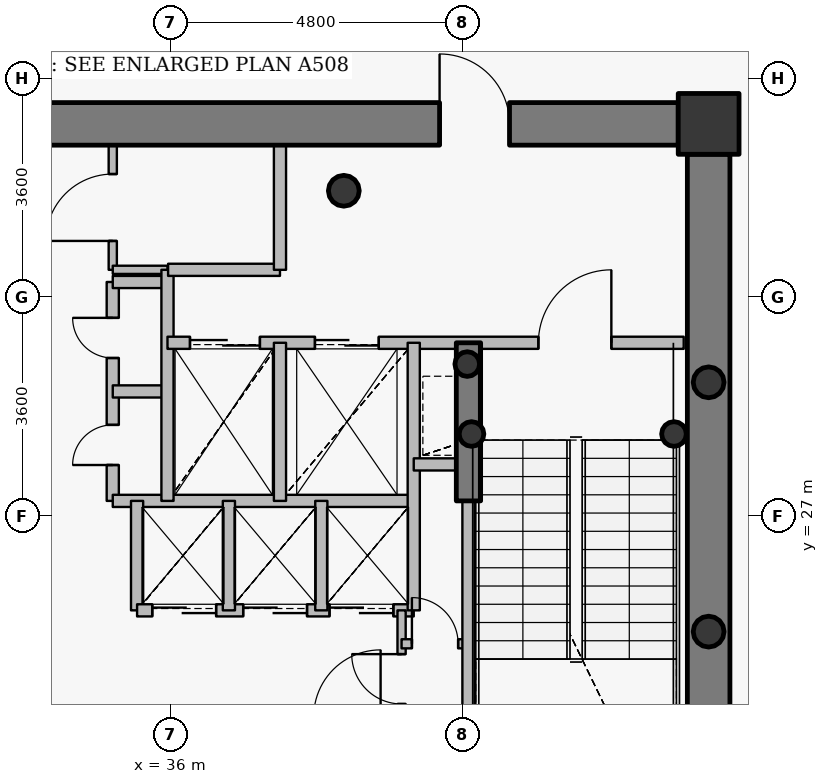
"""IFC4 building model, lengths in metres.
Left out: names, types, materials, properties, quantities, classifications, styles, units other than length and angle.
Written with IfcOpenShell. Run it as: python <this file> out.ifc"""

import sys

from ifc_helpers import new_model, si_unit, direction, frame, frame_2d, origin, origin_2d, place, context, subcontext, project, spatial, rectangle, hollow_circle, extrude, source, transform, mapped, element, fill, save


model = new_model("IFC4")
c1 = context("Model", 3, precision=1e-05, world=origin(), true_north=direction((0.0, 1.0)))
c2 = subcontext(c1, "Body", "Model", "MODEL_VIEW")
j1 = project(units=[si_unit("LENGTHUNIT", "METRE"), si_unit("PLANEANGLEUNIT", "RADIAN")], contexts=[c1])
p1 = place(None, origin())
s1 = spatial("IfcSite", under=j1, at=p1, CompositionType="ELEMENT")
p2 = place(p1, origin())
s2 = spatial("IfcBuilding", under=s1, at=p2, CompositionType="ELEMENT")
p3 = place(p2, frame((0.0, 0.0, 273.0)))
s3 = spatial("IfcBuildingStorey", under=s2, at=p3, CompositionType="ELEMENT", Elevation=273.0)
p4 = place(p3, frame((44.85, 33.45, 0.0), z_axis=(0.0, 0.0, 1.0), x_axis=(1.0, 0.0, 0.0)))
e1 = element("IfcColumn", 1, at=p4, inside=s3, PredefinedType="COLUMN", context=c2, shape_type="SweptSolid", body=[
    extrude(rectangle(XDim=1.0, YDim=1.0, at=origin_2d()), origin(), (0.0, 0.0, 1.0), 3.75),
])
p5 = place(p3, frame((38.85, 32.35, 0.0), z_axis=(0.0, 0.0, 1.0), x_axis=(1.0, 0.0, 0.0)))
e2 = element("IfcColumn", 2, at=p5, inside=s3, PredefinedType="COLUMN", context=c2, shape_type="SweptSolid", body=[
    extrude(hollow_circle(Radius=0.254, WallThickness=0.02, at=origin_2d()), origin(), (0.0, 0.0, 1.0), 3.75),
])
for number, where, z_axis, x_axis in (
    (3, (40.95, 28.35, 0.0), (0.0, 0.0, 1.0), (1.0, 0.0, 0.0)),
    (4, (44.28, 28.35, 0.0), (0.0, 0.0, 1.0), (1.0, 0.0, 0.0)),
    (5, (40.88, 29.5, 0.0), (0.0, 0.0, 1.0), (1.0, 0.0, 0.0)),
):
    element("IfcColumn", number, at=place(p3, frame(where, z_axis=z_axis, x_axis=x_axis)), inside=s3, PredefinedType="COLUMN", context=c2, shape_type="SweptSolid", body=[
        extrude(hollow_circle(Radius=0.203, WallThickness=0.016, at=origin_2d()), origin(), (0.0, 0.0, 1.0), 3.75),
    ])
p6 = place(p3, frame((27.65, 33.45, 0.0), z_axis=(0.0, 0.0, 1.0), x_axis=(1.0, 0.0, 0.0)))
e6 = element("IfcWall", 6, at=p6, inside=s3, PredefinedType="SHEAR", context=c2, shape_type="SweptSolid", body=[
    extrude(rectangle(XDim=16.7, YDim=0.7, at=frame_2d((8.35, 0.0))), origin(), (0.0, 0.0, 1.0), 3.05),
])
p7 = place(p6, frame((12.775, 0.0, 0.0)))
e7 = element("IfcOpeningElement", 7, at=p7, cuts=e6, PredefinedType="OPENING", context=c2, shape_type="SweptSolid", body=[
    extrude(rectangle(XDim=1.15, YDim=2.15, at=origin_2d()), frame((0.575, 0.36, 1.075), z_axis=(0.0, -1.0, 0.0), x_axis=(1.0, 0.0, 0.0)), (0.0, 0.0, 1.0), 0.72),
])
p8 = place(p3, frame((44.85, 32.95, 0.0), z_axis=(0.0, 0.0, 1.0), x_axis=(0.0, -1.0, 0.0)))
e8 = element("IfcWall", 8, at=p8, inside=s3, PredefinedType="SHEAR", context=c2, shape_type="SweptSolid", body=[
    extrude(rectangle(XDim=11.9, YDim=0.7, at=frame_2d((5.95, 0.0))), origin(), (0.0, 0.0, 1.0), 3.05),
])
p9 = place(p3, frame((40.9, 27.25, 0.0), z_axis=(0.0, 0.0, 1.0), x_axis=(0.0, 1.0, 0.0)))
e9 = element("IfcWall", 9, at=p9, inside=s3, PredefinedType="SHEAR", context=c2, shape_type="SweptSolid", body=[
    extrude(rectangle(XDim=2.6, YDim=0.4, at=frame_2d((1.3, 0.0))), origin(), (0.0, 0.0, 1.0), 3.1),
])
for number, where, z_axis, x_axis in (
    (10, (44.85, 25.1, 0.0), (0.0, 0.0, 1.0), (1.0, 0.0, 0.0)),
    (11, (44.85, 29.2, 0.0), (0.0, 0.0, 1.0), (1.0, 0.0, 0.0)),
):
    element("IfcColumn", number, at=place(p3, frame(where, z_axis=z_axis, x_axis=x_axis)), inside=s3, PredefinedType="COLUMN", context=c2, shape_type="SweptSolid", body=[
        extrude(hollow_circle(Radius=0.254, WallThickness=0.02, at=origin_2d()), origin(), (0.0, 0.0, 1.0), 3.75),
    ])
p10 = place(p3, frame((35.05, 27.25, 0.0), z_axis=(0.0, 0.0, 1.0), x_axis=(0.0, 1.0, 0.0)))
e12 = element("IfcWall", 12, at=p10, inside=s3, PredefinedType="PARTITIONING", context=c2, shape_type="SweptSolid", body=[
    extrude(rectangle(XDim=3.6, YDim=0.2, at=frame_2d((1.8, 0.0))), origin(), (0.0, 0.0, 1.0), 3.5),
])
p11 = place(p10, frame((0.59, 0.0, 0.0)))
e13 = element("IfcOpeningElement", 13, at=p11, cuts=e12, PredefinedType="OPENING", context=c2, shape_type="SweptSolid", body=[
    extrude(rectangle(XDim=0.66, YDim=2.05, at=origin_2d()), frame((0.33, 0.11, 1.025), z_axis=(0.0, -1.0, 0.0), x_axis=(1.0, 0.0, 0.0)), (0.0, 0.0, 1.0), 0.22),
])
p12 = place(p10, frame((2.35, 0.0, 0.0)))
e14 = element("IfcOpeningElement", 14, at=p12, cuts=e12, PredefinedType="OPENING", context=c2, shape_type="SweptSolid", body=[
    extrude(rectangle(XDim=0.66, YDim=2.05, at=origin_2d()), frame((0.33, 0.11, 1.025), z_axis=(0.0, -1.0, 0.0), x_axis=(1.0, 0.0, 0.0)), (0.0, 0.0, 1.0), 0.22),
])
p13 = place(p3, frame((35.05, 27.25, 0.0), z_axis=(0.0, 0.0, 1.0), x_axis=(1.0, 0.0, 0.0)))
e15 = element("IfcWall", 15, at=p13, inside=s3, PredefinedType="PARTITIONING", context=c2, shape_type="SweptSolid", body=[
    extrude(rectangle(XDim=4.95, YDim=0.2, at=frame_2d((2.475, 0.0))), origin(), (0.0, 0.0, 1.0), 3.085),
])
for number, where, z_axis, x_axis in (
    (16, (35.05, 29.05, 0.0), (0.0, 0.0, 1.0), (1.0, 0.0, 0.0)),
    (17, (35.05, 30.85, 0.0), (0.0, 0.0, 1.0), (1.0, 0.0, 0.0)),
):
    element("IfcWall", number, at=place(p3, frame(where, z_axis=z_axis, x_axis=x_axis)), inside=s3, PredefinedType="PARTITIONING", context=c2, shape_type="SweptSolid", body=[
        extrude(rectangle(XDim=0.9, YDim=0.2, at=frame_2d((0.45, 0.0))), origin(), (0.0, 0.0, 1.0), 3.5),
    ])
p14 = place(p3, frame((35.05, 31.05, 0.0), z_axis=(0.0, 0.0, 1.0), x_axis=(0.0, 1.0, 0.0)))
e18 = element("IfcWall", 18, at=p14, inside=s3, PredefinedType="PARTITIONING", context=c2, shape_type="SweptSolid", body=[
    extrude(rectangle(XDim=2.05, YDim=0.135, at=frame_2d((1.025, 0.0))), origin(), (0.0, 0.0, 1.0), 3.085),
])
p15 = place(p14, frame((0.475, 0.0, 0.0)))
e19 = element("IfcOpeningElement", 19, at=p15, cuts=e18, PredefinedType="OPENING", context=c2, shape_type="SweptSolid", body=[
    extrude(rectangle(XDim=1.1, YDim=2.15, at=origin_2d()), frame((0.55, 0.078, 1.075), z_axis=(0.0, -1.0, 0.0), x_axis=(1.0, 0.0, 0.0)), (0.0, 0.0, 1.0), 0.155),
])
p16 = place(p3, frame((35.05, 31.05, 0.0), z_axis=(0.0, 0.0, 1.0), x_axis=(1.0, 0.0, 0.0)))
e20 = element("IfcWall", 20, at=p16, inside=s3, PredefinedType="PARTITIONING", context=c2, shape_type="SweptSolid", body=[
    extrude(rectangle(XDim=0.9, YDim=0.135, at=frame_2d((0.45, 0.0))), origin(), (0.0, 0.0, 1.0), 3.5),
])
p17 = place(p3, frame((35.45, 25.45, 0.0), z_axis=(0.0, 0.0, 1.0), x_axis=(0.0, 1.0, 0.0)))
e21 = element("IfcWall", 21, at=p17, inside=s3, PredefinedType="PARTITIONING", context=c2, shape_type="SweptSolid", body=[
    extrude(rectangle(XDim=1.8, YDim=0.2, at=frame_2d((0.9, 0.0))), origin(), (0.0, 0.0, 1.0), 3.5),
])
p18 = place(p3, frame((35.45, 25.45, 0.0), z_axis=(0.0, 0.0, 1.0), x_axis=(1.0, 0.0, 0.0)))
e22 = element("IfcWall", 22, at=p18, inside=s3, PredefinedType="PARTITIONING", context=c2, shape_type="SweptSolid", body=[
    extrude(rectangle(XDim=4.55, YDim=0.2, at=frame_2d((2.275, 0.0))), origin(), (0.0, 0.0, 1.0), 3.085),
])
p19 = place(p18, frame((0.25, 0.0, 0.0)))
e23 = element("IfcOpeningElement", 23, at=p19, cuts=e22, PredefinedType="OPENING", context=c2, shape_type="SweptSolid", body=[
    extrude(rectangle(XDim=1.05, YDim=2.15, at=origin_2d()), frame((0.525, 0.11, 1.075), z_axis=(0.0, -1.0, 0.0), x_axis=(1.0, 0.0, 0.0)), (0.0, 0.0, 1.0), 0.22),
])
p20 = place(p18, frame((1.745, 0.0, 0.0)))
e24 = element("IfcOpeningElement", 24, at=p20, cuts=e22, PredefinedType="OPENING", context=c2, shape_type="SweptSolid", body=[
    extrude(rectangle(XDim=1.05, YDim=2.15, at=origin_2d()), frame((0.525, 0.11, 1.075), z_axis=(0.0, -1.0, 0.0), x_axis=(1.0, 0.0, 0.0)), (0.0, 0.0, 1.0), 0.22),
])
p21 = place(p18, frame((3.165, 0.0, 0.0)))
e25 = element("IfcOpeningElement", 25, at=p21, cuts=e22, PredefinedType="OPENING", context=c2, shape_type="SweptSolid", body=[
    extrude(rectangle(XDim=1.05, YDim=2.15, at=origin_2d()), frame((0.525, 0.11, 1.075), z_axis=(0.0, -1.0, 0.0), x_axis=(1.0, 0.0, 0.0)), (0.0, 0.0, 1.0), 0.22),
])
p22 = place(p3, frame((35.95, 27.25, 0.0), z_axis=(0.0, 0.0, 1.0), x_axis=(0.0, 1.0, 0.0)))
e26 = element("IfcWall", 26, at=p22, inside=s3, PredefinedType="PARTITIONING", context=c2, shape_type="SweptSolid", body=[
    extrude(rectangle(XDim=3.8, YDim=0.2, at=frame_2d((1.9, 0.0))), origin(), (0.0, 0.0, 1.0), 3.5),
])
p23 = place(p3, frame((35.95, 29.85, 0.0), z_axis=(0.0, 0.0, 1.0), x_axis=(1.0, 0.0, 0.0)))
e27 = element("IfcWall", 27, at=p23, inside=s3, PredefinedType="PARTITIONING", context=c2, shape_type="SweptSolid", body=[
    extrude(rectangle(XDim=8.49, YDim=0.2, at=frame_2d((4.245, 0.0))), origin(), (0.0, 0.0, 1.0), 3.085),
])
p24 = place(p23, frame((6.1, 0.0, 0.0)))
e28 = element("IfcOpeningElement", 28, at=p24, cuts=e27, PredefinedType="OPENING", context=c2, shape_type="SweptSolid", body=[
    extrude(rectangle(XDim=1.2, YDim=2.15, at=origin_2d()), frame((0.6, 0.11, 1.075), z_axis=(0.0, -1.0, 0.0), x_axis=(1.0, 0.0, 0.0)), (0.0, 0.0, 1.0), 0.22),
])
p25 = place(p23, frame((0.37, 0.0, 0.0)))
e29 = element("IfcOpeningElement", 29, at=p25, cuts=e27, PredefinedType="OPENING", context=c2, shape_type="SweptSolid", body=[
    extrude(rectangle(XDim=1.15, YDim=2.15, at=origin_2d()), frame((0.575, 0.11, 1.075), z_axis=(0.0, -1.0, 0.0), x_axis=(1.0, 0.0, 0.0)), (0.0, 0.0, 1.0), 0.22),
])
p26 = place(p23, frame((2.425, 0.0, 0.0)))
e30 = element("IfcOpeningElement", 30, at=p26, cuts=e27, PredefinedType="OPENING", context=c2, shape_type="SweptSolid", body=[
    extrude(rectangle(XDim=1.05, YDim=2.15, at=origin_2d()), frame((0.525, 0.11, 1.075), z_axis=(0.0, -1.0, 0.0), x_axis=(1.0, 0.0, 0.0)), (0.0, 0.0, 1.0), 0.22),
])
p27 = place(p3, frame((35.96, 31.05, 0.0), z_axis=(0.0, 0.0, 1.0), x_axis=(1.0, 0.0, 0.0)))
e31 = element("IfcWall", 31, at=p27, inside=s3, PredefinedType="PARTITIONING", context=c2, shape_type="SweptSolid", body=[
    extrude(rectangle(XDim=1.84, YDim=0.2, at=frame_2d((0.92, 0.0))), origin(), (0.0, 0.0, 1.0), 3.5),
])
p28 = place(p3, frame((36.96, 25.45, 0.0), z_axis=(0.0, 0.0, 1.0), x_axis=(0.0, 1.0, 0.0)))
e32 = element("IfcWall", 32, at=p28, inside=s3, PredefinedType="PARTITIONING", context=c2, shape_type="SweptSolid", body=[
    extrude(rectangle(XDim=1.8, YDim=0.2, at=frame_2d((0.9, 0.0))), origin(), (0.0, 0.0, 1.0), 3.5),
])
p29 = place(p3, frame((37.8, 27.25, 0.0), z_axis=(0.0, 0.0, 1.0), x_axis=(0.0, 1.0, 0.0)))
e33 = element("IfcWall", 33, at=p29, inside=s3, PredefinedType="PARTITIONING", context=c2, shape_type="SweptSolid", body=[
    extrude(rectangle(XDim=2.6, YDim=0.2, at=frame_2d((1.3, 0.0))), origin(), (0.0, 0.0, 1.0), 3.5),
])
p30 = place(p3, frame((37.8, 31.05, 0.0), z_axis=(0.0, 0.0, 1.0), x_axis=(0.0, 1.0, 0.0)))
e34 = element("IfcWall", 34, at=p30, inside=s3, PredefinedType="PARTITIONING", context=c2, shape_type="SweptSolid", body=[
    extrude(rectangle(XDim=2.05, YDim=0.2, at=frame_2d((1.025, 0.0))), origin(), (0.0, 0.0, 1.0), 3.085),
])
p31 = place(p3, frame((38.48, 25.45, 0.0), z_axis=(0.0, 0.0, 1.0), x_axis=(0.0, 1.0, 0.0)))
e35 = element("IfcWall", 35, at=p31, inside=s3, PredefinedType="PARTITIONING", context=c2, shape_type="SweptSolid", body=[
    extrude(rectangle(XDim=1.8, YDim=0.2, at=frame_2d((0.9, 0.0))), origin(), (0.0, 0.0, 1.0), 3.5),
])
p32 = place(p3, frame((39.8, 23.7, 0.0), z_axis=(0.0, 0.0, 1.0), x_axis=(0.0, 1.0, 0.0)))
e36 = element("IfcWall", 36, at=p32, inside=s3, PredefinedType="PARTITIONING", context=c2, shape_type="SweptSolid", body=[
    extrude(rectangle(XDim=1.75, YDim=0.135, at=frame_2d((0.875, 0.0))), origin(), (0.0, 0.0, 1.0), 3.5),
])
p33 = place(p32, frame((0.21, 0.0, 0.0)))
e37 = element("IfcOpeningElement", 37, at=p33, cuts=e36, PredefinedType="OPENING", context=c2, shape_type="SweptSolid", body=[
    extrude(rectangle(XDim=0.82, YDim=2.1, at=origin_2d()), frame((0.41, 0.078, 1.05), z_axis=(0.0, -1.0, 0.0), x_axis=(1.0, 0.0, 0.0)), (0.0, 0.0, 1.0), 0.155),
])
p34 = place(p3, frame((39.8, 24.9, 0.0), z_axis=(0.0, 0.0, 1.0), x_axis=(1.0, 0.0, 0.0)))
e38 = element("IfcWall", 38, at=p34, inside=s3, PredefinedType="PARTITIONING", context=c2, shape_type="SweptSolid", body=[
    extrude(rectangle(XDim=1.1, YDim=0.15, at=frame_2d((0.55, 0.0))), origin(), (0.0, 0.0, 1.0), 3.5),
])
p35 = place(p34, frame((0.17, 0.0, 0.0)))
e39 = element("IfcOpeningElement", 39, at=p35, cuts=e38, PredefinedType="OPENING", context=c2, shape_type="SweptSolid", body=[
    extrude(rectangle(XDim=0.76, YDim=2.1, at=origin_2d()), frame((0.38, 0.085, 1.05), z_axis=(0.0, -1.0, 0.0), x_axis=(1.0, 0.0, 0.0)), (0.0, 0.0, 1.0), 0.17),
])
p36 = place(p3, frame((40.0, 25.45, 0.0), z_axis=(0.0, 0.0, 1.0), x_axis=(0.0, 1.0, 0.0)))
e40 = element("IfcWall", 40, at=p36, inside=s3, PredefinedType="PARTITIONING", context=c2, shape_type="SweptSolid", body=[
    extrude(rectangle(XDim=4.4, YDim=0.2, at=frame_2d((2.2, 0.0))), origin(), (0.0, 0.0, 1.0), 3.5),
])
p37 = place(p3, frame((40.0, 27.85, 0.0), z_axis=(0.0, 0.0, 1.0), x_axis=(1.0, 0.0, 0.0)))
e41 = element("IfcWall", 41, at=p37, inside=s3, PredefinedType="PARTITIONING", context=c2, shape_type="SweptSolid", body=[
    extrude(rectangle(XDim=0.9, YDim=0.2, at=frame_2d((0.45, 0.0))), origin(), (0.0, 0.0, 1.0), 3.5),
])
p38 = place(p3, frame((40.9, 21.33, 0.0), z_axis=(0.0, 0.0, 1.0), x_axis=(0.0, 1.0, 0.0)))
e42 = element("IfcWall", 42, at=p38, inside=s3, PredefinedType="PARTITIONING", context=c2, shape_type="SweptSolid", body=[
    extrude(rectangle(XDim=5.91, YDim=0.2, at=frame_2d((2.955, 0.0))), origin(), (0.0, 0.0, 1.0), 3.035),
])
p39 = place(p3, frame((45.2, 33.8, 0.0), z_axis=(0.0, 0.0, 1.0), x_axis=(-1.0, 0.0, 0.0)))
e43 = element("IfcWall", 43, at=p39, inside=s3, PredefinedType="PARTITIONING", context=c2, shape_type="SweptSolid", body=[
    extrude(rectangle(XDim=0.84, YDim=0.135, at=frame_2d((0.42, 0.0))), origin(), (0.0, 0.0, 1.0), 3.035),
])
p40 = place(p3, frame((45.2, 32.96, 0.0), z_axis=(0.0, 0.0, 1.0), x_axis=(0.0, 1.0, 0.0)))
e44 = element("IfcWall", 44, at=p40, inside=s3, PredefinedType="PARTITIONING", context=c2, shape_type="SweptSolid", body=[
    extrude(rectangle(XDim=0.532, YDim=0.135, at=frame_2d((0.266, 0.0))), origin(), (0.0, 0.0, 1.0), 3.185),
])
m1 = source(origin(), c2, "Body", "SweptSolid", [
    extrude(rectangle(XDim=1.15, YDim=2.15, at=origin_2d()), frame((0.575, 0.025, 1.075), z_axis=(0.0, -1.0, 0.0), x_axis=(1.0, 0.0, 0.0)), (0.0, 0.0, 1.0), 0.05),
])
p41 = place(p7, origin())
e45 = element("IfcDoor", 45, at=p41, inside=s3, OperationType="SINGLE_SWING_LEFT", PredefinedType="DOOR", context=c2, shape_type="MappedRepresentation", body=[
    mapped(m1, transform((0.0, 0.0, 0.0), x_axis=(1.0, 0.0, 0.0), y_axis=(0.0, 1.0, 0.0), z_axis=(0.0, 0.0, 1.0), scale=1.0)),
])
fill(e7, e45)
m2 = source(origin(), c2, "Body", "SweptSolid", [
    extrude(rectangle(XDim=1.2, YDim=2.15, at=origin_2d()), frame((0.6, 0.025, 1.075), z_axis=(0.0, -1.0, 0.0), x_axis=(1.0, 0.0, 0.0)), (0.0, 0.0, 1.0), 0.05),
])
p42 = place(p24, origin())
e46 = element("IfcDoor", 46, at=p42, inside=s3, OperationType="SINGLE_SWING_RIGHT", PredefinedType="DOOR", context=c2, shape_type="MappedRepresentation", body=[
    mapped(m2, transform((0.0, 0.0, 0.0), x_axis=(1.0, 0.0, 0.0), y_axis=(0.0, 1.0, 0.0), z_axis=(0.0, 0.0, 1.0), scale=1.0)),
])
fill(e28, e46)
m3 = source(origin(), c2, "Body", "SweptSolid", [
    extrude(rectangle(XDim=1.15, YDim=2.15, at=origin_2d()), frame((0.575, 0.025, 1.075), z_axis=(0.0, -1.0, 0.0), x_axis=(1.0, 0.0, 0.0)), (0.0, 0.0, 1.0), 0.05),
])
p43 = place(p25, origin())
e47 = element("IfcDoor", 47, at=p43, inside=s3, OperationType="DOUBLE_DOOR_SLIDING", PredefinedType="USERDEFINED", context=c2, shape_type="MappedRepresentation", body=[
    mapped(m3, transform((0.0, 0.0, 0.0), x_axis=(1.0, 0.0, 0.0), y_axis=(0.0, 1.0, 0.0), z_axis=(0.0, 0.0, 1.0), scale=1.0)),
])
fill(e29, e47)
m4 = source(origin(), c2, "Body", "SweptSolid", [
    extrude(rectangle(XDim=1.05, YDim=2.15, at=origin_2d()), frame((0.525, 0.025, 1.075), z_axis=(0.0, -1.0, 0.0), x_axis=(1.0, 0.0, 0.0)), (0.0, 0.0, 1.0), 0.05),
])
p44 = place(p26, origin())
e48 = element("IfcDoor", 48, at=p44, inside=s3, OperationType="DOUBLE_DOOR_SLIDING", PredefinedType="USERDEFINED", context=c2, shape_type="MappedRepresentation", body=[
    mapped(m4, transform((0.0, 0.0, 0.0), x_axis=(1.0, 0.0, 0.0), y_axis=(0.0, 1.0, 0.0), z_axis=(0.0, 0.0, 1.0), scale=1.0)),
])
fill(e30, e48)
p45 = place(p19, origin())
e49 = element("IfcDoor", 49, at=p45, inside=s3, OperationType="DOUBLE_DOOR_SLIDING", PredefinedType="USERDEFINED", context=c2, shape_type="MappedRepresentation", body=[
    mapped(m4, transform((0.0, 0.0, 0.0), x_axis=(1.0, 0.0, 0.0), y_axis=(0.0, 1.0, 0.0), z_axis=(0.0, 0.0, 1.0), scale=1.0)),
])
fill(e23, e49)
p46 = place(p20, origin())
e50 = element("IfcDoor", 50, at=p46, inside=s3, OperationType="DOUBLE_DOOR_SLIDING", PredefinedType="USERDEFINED", context=c2, shape_type="MappedRepresentation", body=[
    mapped(m4, transform((0.0, 0.0, 0.0), x_axis=(1.0, 0.0, 0.0), y_axis=(0.0, 1.0, 0.0), z_axis=(0.0, 0.0, 1.0), scale=1.0)),
])
fill(e24, e50)
p47 = place(p21, origin())
e51 = element("IfcDoor", 51, at=p47, inside=s3, OperationType="DOUBLE_DOOR_SLIDING", PredefinedType="USERDEFINED", context=c2, shape_type="MappedRepresentation", body=[
    mapped(m4, transform((0.0, 0.0, 0.0), x_axis=(1.0, 0.0, 0.0), y_axis=(0.0, 1.0, 0.0), z_axis=(0.0, 0.0, 1.0), scale=1.0)),
])
fill(e25, e51)
m5 = source(origin(), c2, "Body", "SweptSolid", [
    extrude(rectangle(XDim=0.66, YDim=2.05, at=origin_2d()), frame((0.33, 0.025, 1.025), z_axis=(0.0, -1.0, 0.0), x_axis=(1.0, 0.0, 0.0)), (0.0, 0.0, 1.0), 0.05),
])
p48 = place(p11, origin())
e52 = element("IfcDoor", 52, at=p48, inside=s3, OperationType="SINGLE_SWING_LEFT", PredefinedType="USERDEFINED", context=c2, shape_type="MappedRepresentation", body=[
    mapped(m5, transform((0.0, 0.0, 0.0), x_axis=(1.0, 0.0, 0.0), y_axis=(0.0, 1.0, 0.0), z_axis=(0.0, 0.0, 1.0), scale=1.0)),
])
fill(e13, e52)
p49 = place(p12, origin())
e53 = element("IfcDoor", 53, at=p49, inside=s3, OperationType="SINGLE_SWING_RIGHT", PredefinedType="USERDEFINED", context=c2, shape_type="MappedRepresentation", body=[
    mapped(m5, transform((0.0, 0.0, 0.0), x_axis=(1.0, 0.0, 0.0), y_axis=(0.0, 1.0, 0.0), z_axis=(0.0, 0.0, 1.0), scale=1.0)),
])
fill(e14, e53)
m6 = source(origin(), c2, "Body", "SweptSolid", [
    extrude(rectangle(XDim=1.1, YDim=2.15, at=origin_2d()), frame((0.55, 0.025, 1.075), z_axis=(0.0, -1.0, 0.0), x_axis=(1.0, 0.0, 0.0)), (0.0, 0.0, 1.0), 0.05),
])
p50 = place(p15, origin())
e54 = element("IfcDoor", 54, at=p50, inside=s3, OperationType="SINGLE_SWING_LEFT", PredefinedType="DOOR", context=c2, shape_type="MappedRepresentation", body=[
    mapped(m6, transform((0.0, 0.0, 0.0), x_axis=(1.0, 0.0, 0.0), y_axis=(0.0, 1.0, 0.0), z_axis=(0.0, 0.0, 1.0), scale=1.0)),
])
fill(e19, e54)
m7 = source(origin(), c2, "Body", "SweptSolid", [
    extrude(rectangle(XDim=0.82, YDim=2.1, at=origin_2d()), frame((0.41, 0.025, 1.05), z_axis=(0.0, -1.0, 0.0), x_axis=(1.0, 0.0, 0.0)), (0.0, 0.0, 1.0), 0.05),
])
p51 = place(p33, origin())
e55 = element("IfcDoor", 55, at=p51, inside=s3, OperationType="SINGLE_SWING_RIGHT", PredefinedType="DOOR", context=c2, shape_type="MappedRepresentation", body=[
    mapped(m7, transform((0.0, 0.0, 0.0), x_axis=(1.0, 0.0, 0.0), y_axis=(0.0, 1.0, 0.0), z_axis=(0.0, 0.0, 1.0), scale=1.0)),
])
fill(e37, e55)
m8 = source(origin(), c2, "Body", "SweptSolid", [
    extrude(rectangle(XDim=0.76, YDim=2.1, at=origin_2d()), frame((0.38, 0.025, 1.05), z_axis=(0.0, -1.0, 0.0), x_axis=(1.0, 0.0, 0.0)), (0.0, 0.0, 1.0), 0.05),
])
p52 = place(p35, origin())
e56 = element("IfcDoor", 56, at=p52, inside=s3, OperationType="SINGLE_SWING_LEFT", PredefinedType="DOOR", context=c2, shape_type="MappedRepresentation", body=[
    mapped(m8, transform((0.0, 0.0, 0.0), x_axis=(1.0, 0.0, 0.0), y_axis=(0.0, 1.0, 0.0), z_axis=(0.0, 0.0, 1.0), scale=1.0)),
])
fill(e39, e56)
save(model, sys.argv[1])
